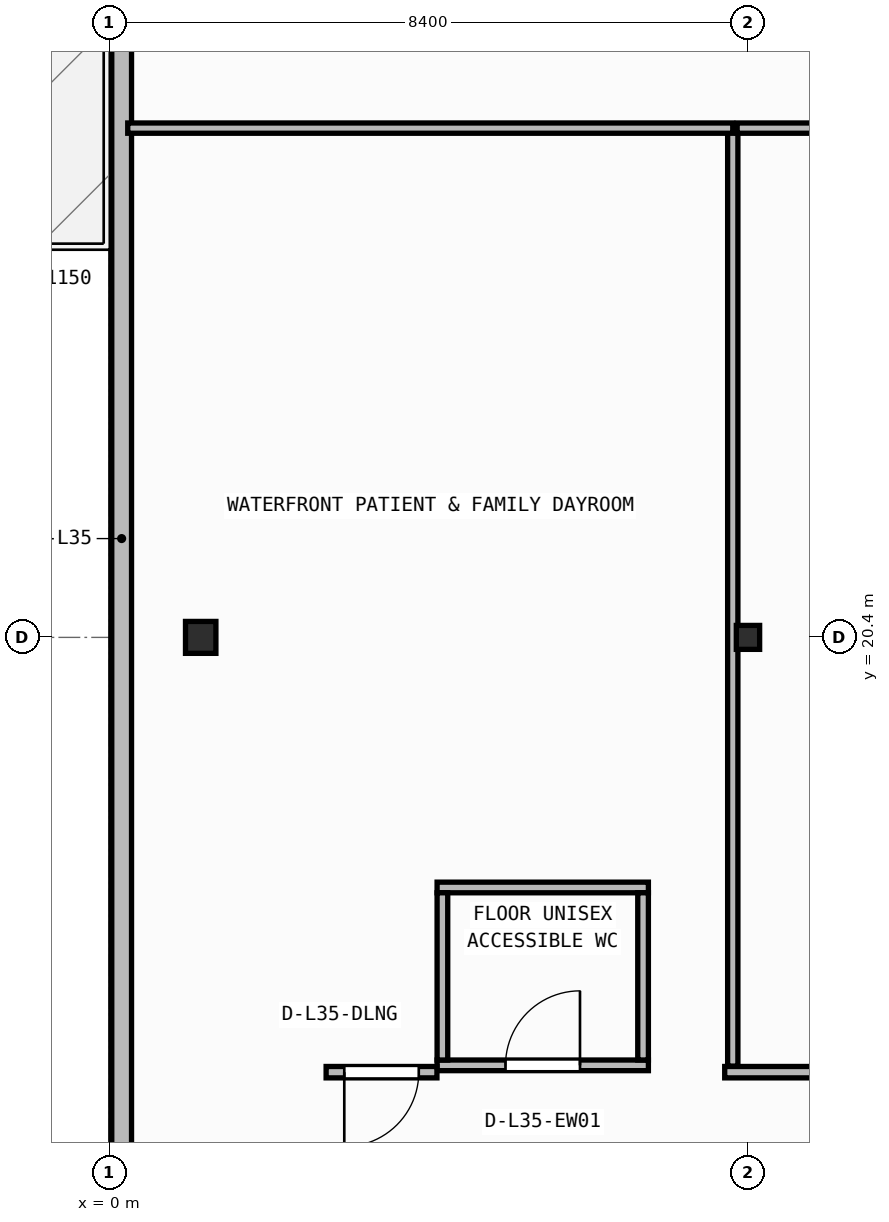
"""IFC4 building model, lengths in metres.
Left out: names, types, materials, properties, quantities, classifications, styles, units other than length and angle.
Written with IfcOpenShell. Run it as: python <this file> out.ifc"""

import sys

from ifc_helpers import new_model, si_unit, direction, frame, frame_2d, origin, origin_2d, place, context, subcontext, project, spatial, rectangle, i_section, extrude, element, fill, save


model = new_model("IFC4")
c1 = context("Model", 3, precision=1e-05, world=origin(), true_north=direction((0.0, 1.0)))
c2 = subcontext(c1, "Body", "Model", "MODEL_VIEW")
j1 = project(units=[si_unit("LENGTHUNIT", "METRE"), si_unit("PLANEANGLEUNIT", "RADIAN")], contexts=[c1])
p1 = place(None, origin())
s1 = spatial("IfcSite", under=j1, at=p1, CompositionType="ELEMENT")
p2 = place(p1, origin())
s2 = spatial("IfcBuilding", under=s1, at=p2, CompositionType="ELEMENT")
p3 = place(p2, frame((0.0, 0.0, 142.85)))
s3 = spatial("IfcBuildingStorey", under=s2, at=p3, CompositionType="ELEMENT", Elevation=142.85)
p4 = place(p3, frame((1.2, 20.4, 0.0), z_axis=(0.0, 0.0, 1.0), x_axis=(1.0, 0.0, 0.0)))
e1 = element("IfcColumn", 1, at=p4, inside=s3, PredefinedType="COLUMN", context=c2, shape_type="SweptSolid", body=[
    extrude(i_section(OverallWidth=0.4, OverallDepth=0.42, WebThickness=0.025, FlangeThickness=0.04, at=origin_2d()), origin(), (0.0, 0.0, 1.0), 3.95),
])
p5 = place(p3, frame((8.4, 20.4, 0.0), z_axis=(0.0, 0.0, 1.0), x_axis=(1.0, 0.0, 0.0)))
e2 = element("IfcColumn", 2, at=p5, inside=s3, PredefinedType="COLUMN", context=c2, shape_type="SweptSolid", body=[
    extrude(i_section(OverallWidth=0.307, OverallDepth=0.315, WebThickness=0.012, FlangeThickness=0.019, FilletRadius=0.017, at=origin_2d()), origin(), (0.0, 0.0, 1.0), 3.95),
])
p6 = place(p3, frame((0.16, 40.64, 0.0), z_axis=(0.0, 0.0, 1.0), x_axis=(0.0, -1.0, 0.0)))
e3 = element("IfcWall", 3, at=p6, inside=s3, PredefinedType="STANDARD", context=c2, shape_type="SweptSolid", body=[
    extrude(rectangle(XDim=37.88, YDim=0.26, at=frame_2d((18.94, 0.0))), origin(), (0.0, 0.0, 1.0), 3.71),
])
p7 = place(p6, frame((6.716, 0.0, 0.0)))
e4 = element("IfcOpeningElement", 4, at=p7, cuts=e3, PredefinedType="OPENING", context=c2, shape_type="SweptSolid", body=[
    extrude(rectangle(XDim=1.3, YDim=2.15, at=frame_2d((0.65, 1.075))), frame((0.0, 0.14, 0.0), z_axis=(0.0, -1.0, 0.0), x_axis=(1.0, 0.0, 0.0)), (0.0, 0.0, 1.0), 0.28),
])
p8 = place(p3, frame((4.31, 14.77, 0.0), z_axis=(0.0, 0.0, 1.0), x_axis=(1.0, 0.0, 0.0)))
e5 = element("IfcWall", 5, at=p8, inside=s3, PredefinedType="PARTITIONING", context=c2, shape_type="SweptSolid", body=[
    extrude(rectangle(XDim=2.78, YDim=0.14, at=frame_2d((1.39, 0.0))), origin(), (0.0, 0.0, 1.0), 3.71),
])
p9 = place(p8, frame((0.9, 0.0, 0.0)))
e6 = element("IfcOpeningElement", 6, at=p9, cuts=e5, PredefinedType="OPENING", context=c2, shape_type="SweptSolid", body=[
    extrude(rectangle(XDim=0.98, YDim=2.1, at=frame_2d((0.49, 1.05))), frame((0.0, 0.08, 0.0), z_axis=(0.0, -1.0, 0.0), x_axis=(1.0, 0.0, 0.0)), (0.0, 0.0, 1.0), 0.16),
])
p10 = place(p3, frame((4.31, 17.11, 0.0), z_axis=(0.0, 0.0, 1.0), x_axis=(1.0, 0.0, 0.0)))
e7 = element("IfcWall", 7, at=p10, inside=s3, PredefinedType="PARTITIONING", context=c2, shape_type="SweptSolid", body=[
    extrude(rectangle(XDim=2.78, YDim=0.14, at=frame_2d((1.39, 0.0))), origin(), (0.0, 0.0, 1.0), 3.71),
])
for number, where, z_axis, x_axis in (
    (8, (4.38, 14.84, 0.0), (0.0, 0.0, 1.0), (0.0, 1.0, 0.0)),
    (9, (7.02, 14.84, 0.0), (0.0, 0.0, 1.0), (0.0, 1.0, 0.0)),
):
    element("IfcWall", number, at=place(p3, frame(where, z_axis=z_axis, x_axis=x_axis)), inside=s3, PredefinedType="PARTITIONING", context=c2, shape_type="SweptSolid", body=[
        extrude(rectangle(XDim=2.2, YDim=0.14, at=frame_2d((1.1, 0.0))), origin(), (0.0, 0.0, 1.0), 3.71),
    ])
p11 = place(p3, frame((4.308, 14.68, 0.0), z_axis=(0.0, 0.0, 1.0), x_axis=(-1.0, 0.0, 0.0)))
e10 = element("IfcWall", 10, at=p11, inside=s3, PredefinedType="PARTITIONING", context=c2, shape_type="SweptSolid", body=[
    extrude(rectangle(XDim=1.458, YDim=0.15, at=frame_2d((0.729, 0.0))), origin(), (0.0, 0.0, 1.0), 3.71),
])
p12 = place(p11, frame((0.239, 0.0, 0.0)))
e11 = element("IfcOpeningElement", 11, at=p12, cuts=e10, PredefinedType="OPENING", context=c2, shape_type="SweptSolid", body=[
    extrude(rectangle(XDim=0.98, YDim=2.1, at=frame_2d((0.49, 1.05))), frame((0.0, 0.085, 0.0), z_axis=(0.0, -1.0, 0.0), x_axis=(1.0, 0.0, 0.0)), (0.0, 0.0, 1.0), 0.17),
])
p13 = place(p3, frame((19.346, 14.68, 0.0), z_axis=(0.0, 0.0, 1.0), x_axis=(-1.0, 0.0, 0.0)))
e12 = element("IfcWall", 12, at=p13, inside=s3, PredefinedType="PARTITIONING", context=c2, shape_type="SweptSolid", body=[
    extrude(rectangle(XDim=11.252, YDim=0.15, at=frame_2d((5.626, 0.0))), origin(), (0.0, 0.0, 1.0), 3.71),
])
p14 = place(p13, frame((5.076, 0.0, 0.0)))
e13 = element("IfcOpeningElement", 13, at=p14, cuts=e12, PredefinedType="OPENING", context=c2, shape_type="SweptSolid", body=[
    extrude(rectangle(XDim=1.1, YDim=2.1, at=frame_2d((0.55, 1.05))), frame((0.0, 0.085, 0.0), z_axis=(0.0, -1.0, 0.0), x_axis=(1.0, 0.0, 0.0)), (0.0, 0.0, 1.0), 0.17),
])
p15 = place(p3, frame((8.2, 14.76, 0.0), z_axis=(0.0, 0.0, 1.0), x_axis=(0.0, 1.0, 0.0)))
e14 = element("IfcWall", 14, at=p15, inside=s3, PredefinedType="PARTITIONING", context=c2, shape_type="SweptSolid", body=[
    extrude(rectangle(XDim=12.34, YDim=0.135, at=frame_2d((6.17, 0.0))), origin(), (0.0, 0.0, 1.0), 3.152),
])
p16 = place(p3, frame((8.2, 27.1, 0.0), z_axis=(0.0, 0.0, 1.0), x_axis=(-1.0, 0.0, 0.0)))
e15 = element("IfcWall", 15, at=p16, inside=s3, PredefinedType="PARTITIONING", context=c2, shape_type="SweptSolid", body=[
    extrude(rectangle(XDim=7.96, YDim=0.135, at=frame_2d((3.98, 0.0))), origin(), (0.0, 0.0, 1.0), 3.71),
])
p17 = place(p3, frame((19.12, 27.1, 0.0), z_axis=(0.0, 0.0, 1.0), x_axis=(-1.0, 0.0, 0.0)))
e16 = element("IfcWall", 16, at=p17, inside=s3, PredefinedType="PARTITIONING", context=c2, shape_type="SweptSolid", body=[
    extrude(rectangle(XDim=10.863, YDim=0.135, at=frame_2d((5.431, 0.0))), origin(), (0.0, 0.0, 1.0), 3.71),
])
p18 = place(p9, origin())
e17 = element("IfcDoor", 17, at=p18, inside=s3, OperationType="SINGLE_SWING_RIGHT", PredefinedType="DOOR", context=c2, shape_type="SweptSolid", body=[
    extrude(rectangle(XDim=0.98, YDim=2.1, at=frame_2d((0.49, 1.05))), frame((0.0, 0.025, 0.0), z_axis=(0.0, -1.0, 0.0), x_axis=(1.0, 0.0, 0.0)), (0.0, 0.0, 1.0), 0.05),
])
fill(e6, e17)
p19 = place(p12, origin())
e18 = element("IfcDoor", 18, at=p19, inside=s3, OperationType="SINGLE_SWING_RIGHT", PredefinedType="DOOR", context=c2, shape_type="SweptSolid", body=[
    extrude(rectangle(XDim=0.98, YDim=2.1, at=frame_2d((0.49, 1.05))), frame((0.0, 0.025, 0.0), z_axis=(0.0, -1.0, 0.0), x_axis=(1.0, 0.0, 0.0)), (0.0, 0.0, 1.0), 0.05),
])
fill(e11, e18)
save(model, sys.argv[1])
